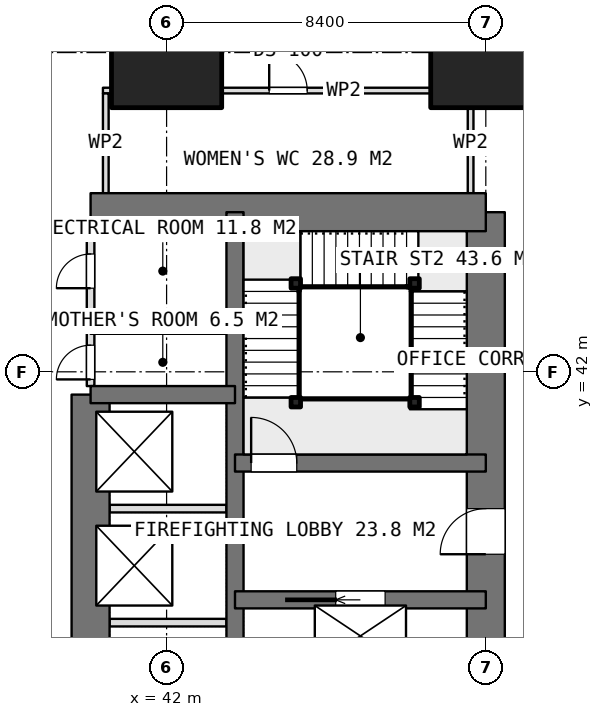
"""IFC4 building model, lengths in metres.
Left out: names, types, materials, properties, quantities, classifications, styles, units other than length and angle.
Written with IfcOpenShell. Run it as: python <this file> out.ifc"""

import sys

from ifc_helpers import new_model, si_unit, direction, frame, frame_2d, origin, origin_2d, place, context, subcontext, project, spatial, rectangle, extrude, element, fill, save


model = new_model("IFC4")
c1 = context("Model", 3, precision=1e-05, world=origin(), true_north=direction((0.0, 1.0)))
c2 = subcontext(c1, "Body", "Model", "MODEL_VIEW")
j1 = project(units=[si_unit("LENGTHUNIT", "METRE"), si_unit("PLANEANGLEUNIT", "RADIAN")], contexts=[c1])
p1 = place(None, origin())
s1 = spatial("IfcSite", under=j1, at=p1, CompositionType="ELEMENT")
p2 = place(p1, origin())
s2 = spatial("IfcBuilding", under=s1, at=p2, CompositionType="ELEMENT")
p3 = place(p2, frame((0.0, 0.0, 95.3)))
s3 = spatial("IfcBuildingStorey", under=s2, at=p3, CompositionType="ELEMENT", Elevation=95.3)
p4 = place(p3, frame((40.0, 46.2, 0.0), z_axis=(0.0, 0.0, 1.0), x_axis=(1.0, 0.0, 0.0)))
e1 = element("IfcWall", 1, at=p4, inside=s3, PredefinedType="SHEAR", context=c2, shape_type="SweptSolid", body=[
    extrude(rectangle(XDim=10.4, YDim=1.0, at=frame_2d((5.2, 0.0))), origin(), (0.0, 0.0, 1.0), 3.75),
])
p5 = place(p3, frame((50.4, 21.0, 0.0), z_axis=(0.0, 0.0, 1.0), x_axis=(0.0, 1.0, 0.0)))
e2 = element("IfcWall", 2, at=p5, inside=s3, PredefinedType="SHEAR", context=c2, shape_type="SweptSolid", body=[
    extrude(rectangle(XDim=25.2, YDim=1.0, at=frame_2d((12.6, 0.0))), origin(), (0.0, 0.0, 1.0), 3.75),
])
p6 = place(p5, frame((16.2, 0.0, 0.0)))
e3 = element("IfcOpeningElement", 3, at=p6, cuts=e2, PredefinedType="OPENING", context=c2, shape_type="SweptSolid", body=[
    extrude(rectangle(XDim=1.2, YDim=2.1, at=frame_2d((0.6, 1.05))), frame((0.0, 0.51, 0.0), z_axis=(0.0, -1.0, 0.0), x_axis=(1.0, 0.0, 0.0)), (0.0, 0.0, 1.0), 1.02),
])
p7 = place(p5, frame((10.05, 0.0, 0.0)))
e4 = element("IfcOpeningElement", 4, at=p7, cuts=e2, PredefinedType="OPENING", context=c2, shape_type="SweptSolid", body=[
    extrude(rectangle(XDim=0.9, YDim=2.1, at=frame_2d((0.45, 1.05))), frame((0.0, 0.51, 0.0), z_axis=(0.0, -1.0, 0.0), x_axis=(1.0, 0.0, 0.0)), (0.0, 0.0, 1.0), 1.02),
])
p8 = place(p5, frame((7.45, 0.0, 0.0)))
e5 = element("IfcOpeningElement", 5, at=p8, cuts=e2, PredefinedType="OPENING", context=c2, shape_type="SweptSolid", body=[
    extrude(rectangle(XDim=0.9, YDim=2.1, at=frame_2d((0.45, 1.05))), frame((0.0, 0.51, 0.0), z_axis=(0.0, -1.0, 0.0), x_axis=(1.0, 0.0, 0.0)), (0.0, 0.0, 1.0), 1.02),
])
p9 = place(p5, frame((0.7, 0.0, 0.0)))
e6 = element("IfcOpeningElement", 6, at=p9, cuts=e2, PredefinedType="OPENING", context=c2, shape_type="SweptSolid", body=[
    extrude(rectangle(XDim=1.2, YDim=2.1, at=frame_2d((0.6, 1.05))), frame((0.0, 0.51, 0.0), z_axis=(0.0, -1.0, 0.0), x_axis=(1.0, 0.0, 0.0)), (0.0, 0.0, 1.0), 1.02),
])
p10 = place(p3, frame((43.8, 21.0, 0.0), z_axis=(0.0, 0.0, 1.0), x_axis=(0.0, 1.0, 0.0)))
e7 = element("IfcWall", 7, at=p10, inside=s3, PredefinedType="SHEAR", context=c2, shape_type="SweptSolid", body=[
    extrude(rectangle(XDim=25.2, YDim=0.45, at=frame_2d((12.6, 0.0))), origin(), (0.0, 0.0, 1.0), 3.75),
])
p11 = place(p3, frame((40.0, 23.4, 0.0), z_axis=(0.0, 0.0, 1.0), x_axis=(0.0, 1.0, 0.0)))
e8 = element("IfcWall", 8, at=p11, inside=s3, PredefinedType="SHEAR", context=c2, shape_type="SweptSolid", body=[
    extrude(rectangle(XDim=18.0, YDim=1.0, at=frame_2d((9.0, 0.0))), origin(), (0.0, 0.0, 1.0), 3.75),
])
p12 = place(p3, frame((40.0, 41.4, 0.0), z_axis=(0.0, 0.0, 1.0), x_axis=(1.0, 0.0, 0.0)))
e9 = element("IfcWall", 9, at=p12, inside=s3, PredefinedType="SHEAR", context=c2, shape_type="SweptSolid", body=[
    extrude(rectangle(XDim=3.8, YDim=0.45, at=frame_2d((1.9, 0.0))), origin(), (0.0, 0.0, 1.0), 3.75),
])
p13 = place(p3, frame((43.8, 36.0, 0.0), z_axis=(0.0, 0.0, 1.0), x_axis=(1.0, 0.0, 0.0)))
e10 = element("IfcWall", 10, at=p13, inside=s3, PredefinedType="SHEAR", context=c2, shape_type="SweptSolid", body=[
    extrude(rectangle(XDim=6.6, YDim=0.45, at=frame_2d((3.3, 0.0))), origin(), (0.0, 0.0, 1.0), 3.75),
])
p14 = place(p13, frame((2.65, 0.0, 0.0)))
e11 = element("IfcOpeningElement", 11, at=p14, cuts=e10, PredefinedType="OPENING", context=c2, shape_type="SweptSolid", body=[
    extrude(rectangle(XDim=1.3, YDim=2.1, at=frame_2d((0.65, 1.05))), frame((0.0, 0.235, 0.0), z_axis=(0.0, -1.0, 0.0), x_axis=(1.0, 0.0, 0.0)), (0.0, 0.0, 1.0), 0.47),
])
p15 = place(p3, frame((43.8, 39.6, 0.0), z_axis=(0.0, 0.0, 1.0), x_axis=(1.0, 0.0, 0.0)))
e12 = element("IfcWall", 12, at=p15, inside=s3, PredefinedType="SHEAR", context=c2, shape_type="SweptSolid", body=[
    extrude(rectangle(XDim=6.6, YDim=0.45, at=frame_2d((3.3, 0.0))), origin(), (0.0, 0.0, 1.0), 3.75),
])
p16 = place(p15, frame((0.425, 0.0, 0.0)))
e13 = element("IfcOpeningElement", 13, at=p16, cuts=e12, PredefinedType="OPENING", context=c2, shape_type="SweptSolid", body=[
    extrude(rectangle(XDim=1.2, YDim=2.1, at=frame_2d((0.6, 1.05))), frame((0.0, 0.235, 0.0), z_axis=(0.0, -1.0, 0.0), x_axis=(1.0, 0.0, 0.0)), (0.0, 0.0, 1.0), 0.47),
])
for number, where, z_axis, x_axis in (
    (14, (42.0, 50.4, 0.0), (0.0, 0.0, 1.0), (1.0, 0.0, 0.0)),
    (15, (50.4, 50.4, 0.0), (0.0, 0.0, 1.0), (1.0, 0.0, 0.0)),
):
    element("IfcColumn", number, at=place(p3, frame(where, z_axis=z_axis, x_axis=x_axis)), inside=s3, PredefinedType="COLUMN", context=c2, shape_type="SweptSolid", body=[
        extrude(rectangle(XDim=2.9, YDim=2.9, at=origin_2d()), origin(), (0.0, 0.0, 1.0), 3.75),
    ])
for number, where, z_axis, x_axis in (
    (16, (40.5, 35.4, 0.0), (0.0, 0.0, 1.0), (1.0, 0.0, 0.0)),
    (17, (40.5, 38.4, 0.0), (0.0, 0.0, 1.0), (1.0, 0.0, 0.0)),
):
    element("IfcWall", number, at=place(p3, frame(where, z_axis=z_axis, x_axis=x_axis)), inside=s3, PredefinedType="PARTITIONING", context=c2, shape_type="SweptSolid", body=[
        extrude(rectangle(XDim=3.075, YDim=0.2, at=frame_2d((1.538, 0.0))), origin(), (0.0, 0.0, 1.0), 3.5),
    ])
p17 = place(p3, frame((40.0, 41.625, 0.0), z_axis=(0.0, 0.0, 1.0), x_axis=(0.0, 1.0, 0.0)))
e18 = element("IfcWall", 18, at=p17, inside=s3, PredefinedType="PARTITIONING", context=c2, shape_type="SweptSolid", body=[
    extrude(rectangle(XDim=4.075, YDim=0.2, at=frame_2d((2.038, 0.0))), origin(), (0.0, 0.0, 1.0), 3.5),
])
p18 = place(p17, frame((2.575, 0.0, 0.0)))
e19 = element("IfcOpeningElement", 19, at=p18, cuts=e18, PredefinedType="OPENING", context=c2, shape_type="SweptSolid", body=[
    extrude(rectangle(XDim=0.9, YDim=2.1, at=frame_2d((0.45, 1.05))), frame((0.0, 0.11, 0.0), z_axis=(0.0, -1.0, 0.0), x_axis=(1.0, 0.0, 0.0)), (0.0, 0.0, 1.0), 0.22),
])
p19 = place(p17, frame((0.175, 0.0, 0.0)))
e20 = element("IfcOpeningElement", 20, at=p19, cuts=e18, PredefinedType="OPENING", context=c2, shape_type="SweptSolid", body=[
    extrude(rectangle(XDim=0.9, YDim=2.1, at=frame_2d((0.45, 1.05))), frame((0.0, 0.11, 0.0), z_axis=(0.0, -1.0, 0.0), x_axis=(1.0, 0.0, 0.0)), (0.0, 0.0, 1.0), 0.22),
])
p20 = place(p3, frame((40.0, 43.1, 0.0), z_axis=(0.0, 0.0, 1.0), x_axis=(1.0, 0.0, 0.0)))
e21 = element("IfcWall", 21, at=p20, inside=s3, PredefinedType="PARTITIONING", context=c2, shape_type="SweptSolid", body=[
    extrude(rectangle(XDim=3.575, YDim=0.2, at=frame_2d((1.788, 0.0))), origin(), (0.0, 0.0, 1.0), 3.5),
])
p21 = place(p3, frame((40.325, 49.4, 0.0), z_axis=(0.0, 0.0, 1.0), x_axis=(1.0, 0.0, 0.0)))
e22 = element("IfcWall", 22, at=p21, inside=s3, PredefinedType="PARTITIONING", context=c2, shape_type="SweptSolid", body=[
    extrude(rectangle(XDim=9.75, YDim=0.15, at=frame_2d((4.875, 0.0))), origin(), (0.0, 0.0, 1.0), 3.5),
])
p22 = place(p21, frame((4.375, 0.0, 0.0)))
e23 = element("IfcOpeningElement", 23, at=p22, cuts=e22, PredefinedType="OPENING", context=c2, shape_type="SweptSolid", body=[
    extrude(rectangle(XDim=1.0, YDim=2.1, at=frame_2d((0.5, 1.05))), frame((0.0, 0.085, 0.0), z_axis=(0.0, -1.0, 0.0), x_axis=(1.0, 0.0, 0.0)), (0.0, 0.0, 1.0), 0.17),
])
for number, where, z_axis, x_axis in (
    (24, (40.4, 46.7, 0.0), (0.0, 0.0, 1.0), (0.0, 1.0, 0.0)),
    (25, (50.0, 46.7, 0.0), (0.0, 0.0, 1.0), (0.0, 1.0, 0.0)),
):
    element("IfcWall", number, at=place(p3, frame(where, z_axis=z_axis, x_axis=x_axis)), inside=s3, PredefinedType="PARTITIONING", context=c2, shape_type="SweptSolid", body=[
        extrude(rectangle(XDim=2.625, YDim=0.15, at=frame_2d((1.312, 0.0))), origin(), (0.0, 0.0, 1.0), 3.5),
    ])
for number, where, z_axis, x_axis in (
    (26, (45.4, 41.2, 0.0), (0.0, 0.0, 1.0), (1.0, 0.0, 0.0)),
    (27, (45.4, 44.325, 0.0), (0.0, 0.0, 1.0), (1.0, 0.0, 0.0)),
    (28, (48.525, 44.325, 0.0), (0.0, 0.0, 1.0), (1.0, 0.0, 0.0)),
    (29, (48.525, 41.2, 0.0), (0.0, 0.0, 1.0), (1.0, 0.0, 0.0)),
):
    element("IfcColumn", number, at=place(p3, frame(where, z_axis=z_axis, x_axis=x_axis)), inside=s3, PredefinedType="COLUMN", context=c2, shape_type="SweptSolid", body=[
        extrude(rectangle(XDim=0.25, YDim=0.25, at=origin_2d()), origin(), (0.0, 0.0, 1.0), 3.75),
    ])
p23 = place(p6, origin())
e30 = element("IfcDoor", 30, at=p23, inside=s3, OperationType="SINGLE_SWING_LEFT", PredefinedType="DOOR", context=c2, shape_type="SweptSolid", body=[
    extrude(rectangle(XDim=1.2, YDim=2.1, at=frame_2d((0.6, 1.05))), frame((0.0, 0.025, 0.0), z_axis=(0.0, -1.0, 0.0), x_axis=(1.0, 0.0, 0.0)), (0.0, 0.0, 1.0), 0.05),
])
fill(e3, e30)
p24 = place(p18, origin())
e31 = element("IfcDoor", 31, at=p24, inside=s3, OperationType="SINGLE_SWING_LEFT", PredefinedType="DOOR", context=c2, shape_type="SweptSolid", body=[
    extrude(rectangle(XDim=0.9, YDim=2.1, at=frame_2d((0.45, 1.05))), frame((0.0, 0.025, 0.0), z_axis=(0.0, -1.0, 0.0), x_axis=(1.0, 0.0, 0.0)), (0.0, 0.0, 1.0), 0.05),
])
fill(e19, e31)
p25 = place(p19, origin())
e32 = element("IfcDoor", 32, at=p25, inside=s3, OperationType="SINGLE_SWING_LEFT", PredefinedType="DOOR", context=c2, shape_type="SweptSolid", body=[
    extrude(rectangle(XDim=0.9, YDim=2.1, at=frame_2d((0.45, 1.05))), frame((0.0, 0.025, 0.0), z_axis=(0.0, -1.0, 0.0), x_axis=(1.0, 0.0, 0.0)), (0.0, 0.0, 1.0), 0.05),
])
fill(e20, e32)
p26 = place(p14, origin())
e33 = element("IfcDoor", 33, at=p26, inside=s3, OperationType="SLIDING_TO_LEFT", PredefinedType="USERDEFINED", context=c2, shape_type="SweptSolid", body=[
    extrude(rectangle(XDim=1.3, YDim=2.1, at=frame_2d((0.65, 1.05))), frame((0.0, 0.025, 0.0), z_axis=(0.0, -1.0, 0.0), x_axis=(1.0, 0.0, 0.0)), (0.0, 0.0, 1.0), 0.05),
])
fill(e11, e33)
p27 = place(p22, origin())
e34 = element("IfcDoor", 34, at=p27, inside=s3, OperationType="SINGLE_SWING_LEFT", PredefinedType="DOOR", context=c2, shape_type="SweptSolid", body=[
    extrude(rectangle(XDim=1.0, YDim=2.1, at=frame_2d((0.5, 1.05))), frame((0.0, 0.025, 0.0), z_axis=(0.0, -1.0, 0.0), x_axis=(1.0, 0.0, 0.0)), (0.0, 0.0, 1.0), 0.05),
])
fill(e23, e34)
p28 = place(p16, origin())
e35 = element("IfcDoor", 35, at=p28, inside=s3, OperationType="SINGLE_SWING_RIGHT", PredefinedType="DOOR", context=c2, shape_type="SweptSolid", body=[
    extrude(rectangle(XDim=1.2, YDim=2.1, at=frame_2d((0.6, 1.05))), frame((0.0, 0.025, 0.0), z_axis=(0.0, -1.0, 0.0), x_axis=(1.0, 0.0, 0.0)), (0.0, 0.0, 1.0), 0.05),
])
fill(e13, e35)
save(model, sys.argv[1])
